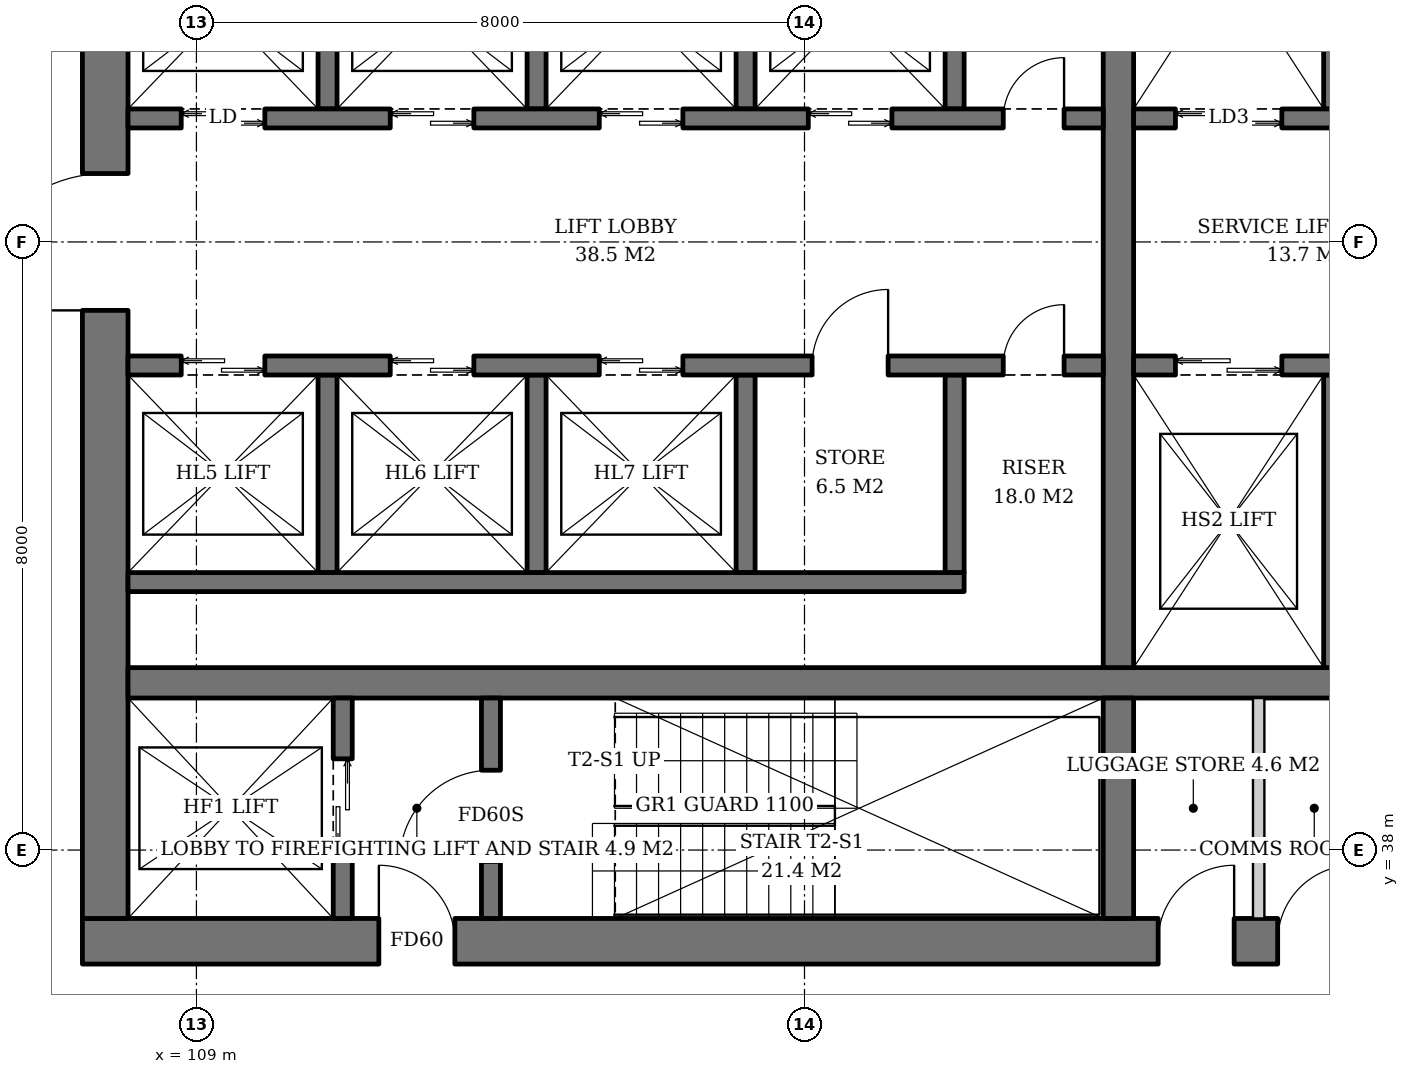
"""IFC4 building model, lengths in metres.
Left out: names, types, materials, properties, quantities, classifications, styles, units other than length and angle.
Written with IfcOpenShell. Run it as: python <this file> out.ifc"""

import sys

from ifc_helpers import new_model, si_unit, direction, frame, frame_2d, origin, place, context, subcontext, project, spatial, rectangle, extrude, element, fill, save


model = new_model("IFC4")
c1 = context("Model", 3, precision=1e-05, world=origin(), true_north=direction((0.0, 1.0)))
c2 = subcontext(c1, "Body", "Model", "MODEL_VIEW")
j1 = project(units=[si_unit("LENGTHUNIT", "METRE"), si_unit("PLANEANGLEUNIT", "RADIAN")], contexts=[c1])
p1 = place(None, origin())
s1 = spatial("IfcSite", under=j1, at=p1, CompositionType="ELEMENT")
p2 = place(p1, origin())
s2 = spatial("IfcBuilding", under=s1, at=p2, CompositionType="ELEMENT")
p3 = place(p2, frame((0.0, 0.0, 47.6)))
s3 = spatial("IfcBuildingStorey", under=s2, at=p3, CompositionType="ELEMENT", Elevation=47.6)
p4 = place(p3, frame((107.5, 36.8, 0.0), z_axis=(0.0, 0.0, 1.0), x_axis=(1.0, 0.0, 0.0)))
e1 = element("IfcWall", 1, at=p4, inside=s3, PredefinedType="SHEAR", context=c2, shape_type="SweptSolid", body=[
    extrude(rectangle(XDim=19.0, YDim=0.6, at=frame_2d((9.5, 0.0))), origin(), (0.0, 0.0, 1.0), 3.8),
])
p5 = place(p4, frame((3.9, 0.0, 0.0)))
e2 = element("IfcOpeningElement", 2, at=p5, cuts=e1, PredefinedType="OPENING", context=c2, shape_type="SweptSolid", body=[
    extrude(rectangle(XDim=1.0, YDim=2.1, at=frame_2d((0.5, 1.05))), frame((0.0, 0.31, 0.0), z_axis=(0.0, -1.0, 0.0), x_axis=(1.0, 0.0, 0.0)), (0.0, 0.0, 1.0), 0.62),
])
p6 = place(p4, frame((14.153, 0.0, 0.0)))
e3 = element("IfcOpeningElement", 3, at=p6, cuts=e1, PredefinedType="OPENING", context=c2, shape_type="SweptSolid", body=[
    extrude(rectangle(XDim=1.0, YDim=2.1, at=frame_2d((0.5, 1.05))), frame((0.0, 0.31, 0.0), z_axis=(0.0, -1.0, 0.0), x_axis=(1.0, 0.0, 0.0)), (0.0, 0.0, 1.0), 0.62),
])
p7 = place(p4, frame((15.725, 0.0, 0.0)))
e4 = element("IfcOpeningElement", 4, at=p7, cuts=e1, PredefinedType="OPENING", context=c2, shape_type="SweptSolid", body=[
    extrude(rectangle(XDim=1.0, YDim=2.1, at=frame_2d((0.5, 1.05))), frame((0.0, 0.31, 0.0), z_axis=(0.0, -1.0, 0.0), x_axis=(1.0, 0.0, 0.0)), (0.0, 0.0, 1.0), 0.62),
])
p8 = place(p4, frame((17.188, 0.0, 0.0)))
e5 = element("IfcOpeningElement", 5, at=p8, cuts=e1, PredefinedType="OPENING", context=c2, shape_type="SweptSolid", body=[
    extrude(rectangle(XDim=1.0, YDim=2.1, at=frame_2d((0.5, 1.05))), frame((0.0, 0.31, 0.0), z_axis=(0.0, -1.0, 0.0), x_axis=(1.0, 0.0, 0.0)), (0.0, 0.0, 1.0), 0.62),
])
p9 = place(p3, frame((107.8, 37.1, 0.0), z_axis=(0.0, 0.0, 1.0), x_axis=(0.0, 1.0, 0.0)))
e6 = element("IfcWall", 6, at=p9, inside=s3, PredefinedType="SHEAR", context=c2, shape_type="SweptSolid", body=[
    extrude(rectangle(XDim=17.8, YDim=0.6, at=frame_2d((8.9, 0.0))), origin(), (0.0, 0.0, 1.0), 3.8),
])
p10 = place(p9, frame((8.0, 0.0, 0.0)))
e7 = element("IfcOpeningElement", 7, at=p10, cuts=e6, PredefinedType="OPENING", context=c2, shape_type="SweptSolid", body=[
    extrude(rectangle(XDim=1.8, YDim=2.4, at=frame_2d((0.9, 1.2))), frame((0.0, 0.31, 0.0), z_axis=(0.0, -1.0, 0.0), x_axis=(1.0, 0.0, 0.0)), (0.0, 0.0, 1.0), 0.62),
])
p11 = place(p3, frame((108.1, 40.2, 0.0), z_axis=(0.0, 0.0, 1.0), x_axis=(1.0, 0.0, 0.0)))
e8 = element("IfcWall", 8, at=p11, inside=s3, PredefinedType="SHEAR", context=c2, shape_type="SweptSolid", body=[
    extrude(rectangle(XDim=17.8, YDim=0.4, at=frame_2d((8.9, 0.0))), origin(), (0.0, 0.0, 1.0), 3.8),
])
p12 = place(p3, frame((121.13, 37.1, 0.0), z_axis=(0.0, 0.0, 1.0), x_axis=(0.0, 1.0, 0.0)))
e9 = element("IfcWall", 9, at=p12, inside=s3, PredefinedType="SHEAR", context=c2, shape_type="SweptSolid", body=[
    extrude(rectangle(XDim=2.9, YDim=0.4, at=frame_2d((1.45, 0.0))), origin(), (0.0, 0.0, 1.0), 3.8),
])
p13 = place(p3, frame((121.13, 40.4, 0.0), z_axis=(0.0, 0.0, 1.0), x_axis=(0.0, 1.0, 0.0)))
e10 = element("IfcWall", 10, at=p13, inside=s3, PredefinedType="SHEAR", context=c2, shape_type="SweptSolid", body=[
    extrude(rectangle(XDim=11.2, YDim=0.4, at=frame_2d((5.6, 0.0))), origin(), (0.0, 0.0, 1.0), 3.8),
])
p14 = place(p3, frame((110.925, 37.1, 0.0), z_axis=(0.0, 0.0, 1.0), x_axis=(0.0, 1.0, 0.0)))
e11 = element("IfcWall", 11, at=p14, inside=s3, PredefinedType="SHEAR", context=c2, shape_type="SweptSolid", body=[
    extrude(rectangle(XDim=2.9, YDim=0.25, at=frame_2d((1.45, 0.0))), origin(), (0.0, 0.0, 1.0), 3.8),
])
p15 = place(p14, frame((0.8, 0.0, 0.0)))
e12 = element("IfcOpeningElement", 12, at=p15, cuts=e11, PredefinedType="OPENING", context=c2, shape_type="SweptSolid", body=[
    extrude(rectangle(XDim=1.3, YDim=2.2, at=frame_2d((0.65, 1.1))), frame((0.0, 0.135, 0.0), z_axis=(0.0, -1.0, 0.0), x_axis=(1.0, 0.0, 0.0)), (0.0, 0.0, 1.0), 0.27),
])
p16 = place(p3, frame((112.875, 37.1, 0.0), z_axis=(0.0, 0.0, 1.0), x_axis=(0.0, 1.0, 0.0)))
e13 = element("IfcWall", 13, at=p16, inside=s3, PredefinedType="SHEAR", context=c2, shape_type="SweptSolid", body=[
    extrude(rectangle(XDim=2.9, YDim=0.25, at=frame_2d((1.45, 0.0))), origin(), (0.0, 0.0, 1.0), 3.8),
])
p17 = place(p16, frame((0.75, 0.0, 0.0)))
e14 = element("IfcOpeningElement", 14, at=p17, cuts=e13, PredefinedType="OPENING", context=c2, shape_type="SweptSolid", body=[
    extrude(rectangle(XDim=1.2, YDim=2.1, at=frame_2d((0.6, 1.05))), frame((0.0, 0.135, 0.0), z_axis=(0.0, -1.0, 0.0), x_axis=(1.0, 0.0, 0.0)), (0.0, 0.0, 1.0), 0.27),
])
for number, where, z_axis, x_axis in (
    (15, (110.725, 47.75, 0.0), (0.0, 0.0, 1.0), (0.0, 1.0, 0.0)),
    (16, (113.475, 47.75, 0.0), (0.0, 0.0, 1.0), (0.0, 1.0, 0.0)),
    (17, (116.225, 47.75, 0.0), (0.0, 0.0, 1.0), (0.0, 1.0, 0.0)),
    (18, (118.975, 47.75, 0.0), (0.0, 0.0, 1.0), (0.0, 1.0, 0.0)),
):
    element("IfcWall", number, at=place(p3, frame(where, z_axis=z_axis, x_axis=x_axis)), inside=s3, PredefinedType="SHEAR", context=c2, shape_type="SweptSolid", body=[
        extrude(rectangle(XDim=2.6, YDim=0.25, at=frame_2d((1.3, 0.0))), origin(), (0.0, 0.0, 1.0), 3.8),
    ])
p18 = place(p3, frame((108.1, 47.625, 0.0), z_axis=(0.0, 0.0, 1.0), x_axis=(1.0, 0.0, 0.0)))
e19 = element("IfcWall", 19, at=p18, inside=s3, PredefinedType="SHEAR", context=c2, shape_type="SweptSolid", body=[
    extrude(rectangle(XDim=12.83, YDim=0.25, at=frame_2d((6.415, 0.0))), origin(), (0.0, 0.0, 1.0), 3.8),
])
p19 = place(p18, frame((0.7, 0.0, 0.0)))
e20 = element("IfcOpeningElement", 20, at=p19, cuts=e19, PredefinedType="OPENING", context=c2, shape_type="SweptSolid", body=[
    extrude(rectangle(XDim=1.1, YDim=2.2, at=frame_2d((0.55, 1.1))), frame((0.0, 0.135, 0.0), z_axis=(0.0, -1.0, 0.0), x_axis=(1.0, 0.0, 0.0)), (0.0, 0.0, 1.0), 0.27),
])
p20 = place(p18, frame((3.45, 0.0, 0.0)))
e21 = element("IfcOpeningElement", 21, at=p20, cuts=e19, PredefinedType="OPENING", context=c2, shape_type="SweptSolid", body=[
    extrude(rectangle(XDim=1.1, YDim=2.2, at=frame_2d((0.55, 1.1))), frame((0.0, 0.135, 0.0), z_axis=(0.0, -1.0, 0.0), x_axis=(1.0, 0.0, 0.0)), (0.0, 0.0, 1.0), 0.27),
])
p21 = place(p18, frame((6.2, 0.0, 0.0)))
e22 = element("IfcOpeningElement", 22, at=p21, cuts=e19, PredefinedType="OPENING", context=c2, shape_type="SweptSolid", body=[
    extrude(rectangle(XDim=1.1, YDim=2.2, at=frame_2d((0.55, 1.1))), frame((0.0, 0.135, 0.0), z_axis=(0.0, -1.0, 0.0), x_axis=(1.0, 0.0, 0.0)), (0.0, 0.0, 1.0), 0.27),
])
p22 = place(p18, frame((8.95, 0.0, 0.0)))
e23 = element("IfcOpeningElement", 23, at=p22, cuts=e19, PredefinedType="OPENING", context=c2, shape_type="SweptSolid", body=[
    extrude(rectangle(XDim=1.1, YDim=2.2, at=frame_2d((0.55, 1.1))), frame((0.0, 0.135, 0.0), z_axis=(0.0, -1.0, 0.0), x_axis=(1.0, 0.0, 0.0)), (0.0, 0.0, 1.0), 0.27),
])
p23 = place(p18, frame((11.515, 0.0, 0.0)))
e24 = element("IfcOpeningElement", 24, at=p23, cuts=e19, PredefinedType="OPENING", context=c2, shape_type="SweptSolid", body=[
    extrude(rectangle(XDim=0.8, YDim=2.0, at=frame_2d((0.4, 1.0))), frame((0.0, 0.135, 0.0), z_axis=(0.0, -1.0, 0.0), x_axis=(1.0, 0.0, 0.0)), (0.0, 0.0, 1.0), 0.27),
])
for number, where, z_axis, x_axis in (
    (25, (110.725, 44.25, 0.0), (0.0, 0.0, 1.0), (0.0, -1.0, 0.0)),
    (26, (113.475, 44.25, 0.0), (0.0, 0.0, 1.0), (0.0, -1.0, 0.0)),
    (27, (116.225, 44.25, 0.0), (0.0, 0.0, 1.0), (0.0, -1.0, 0.0)),
    (28, (118.975, 44.25, 0.0), (0.0, 0.0, 1.0), (0.0, -1.0, 0.0)),
):
    element("IfcWall", number, at=place(p3, frame(where, z_axis=z_axis, x_axis=x_axis)), inside=s3, PredefinedType="SHEAR", context=c2, shape_type="SweptSolid", body=[
        extrude(rectangle(XDim=2.6, YDim=0.25, at=frame_2d((1.3, 0.0))), origin(), (0.0, 0.0, 1.0), 3.8),
    ])
p24 = place(p3, frame((108.1, 41.525, 0.0), z_axis=(0.0, 0.0, 1.0), x_axis=(1.0, 0.0, 0.0)))
e29 = element("IfcWall", 29, at=p24, inside=s3, PredefinedType="SHEAR", context=c2, shape_type="SweptSolid", body=[
    extrude(rectangle(XDim=11.0, YDim=0.25, at=frame_2d((5.5, 0.0))), origin(), (0.0, 0.0, 1.0), 3.8),
])
p25 = place(p3, frame((108.1, 44.375, 0.0), z_axis=(0.0, 0.0, 1.0), x_axis=(1.0, 0.0, 0.0)))
e30 = element("IfcWall", 30, at=p25, inside=s3, PredefinedType="SHEAR", context=c2, shape_type="SweptSolid", body=[
    extrude(rectangle(XDim=12.83, YDim=0.25, at=frame_2d((6.415, 0.0))), origin(), (0.0, 0.0, 1.0), 3.8),
])
p26 = place(p25, frame((0.7, 0.0, 0.0)))
e31 = element("IfcOpeningElement", 31, at=p26, cuts=e30, PredefinedType="OPENING", context=c2, shape_type="SweptSolid", body=[
    extrude(rectangle(XDim=1.1, YDim=2.2, at=frame_2d((0.55, 1.1))), frame((0.0, 0.135, 0.0), z_axis=(0.0, -1.0, 0.0), x_axis=(1.0, 0.0, 0.0)), (0.0, 0.0, 1.0), 0.27),
])
p27 = place(p25, frame((3.45, 0.0, 0.0)))
e32 = element("IfcOpeningElement", 32, at=p27, cuts=e30, PredefinedType="OPENING", context=c2, shape_type="SweptSolid", body=[
    extrude(rectangle(XDim=1.1, YDim=2.2, at=frame_2d((0.55, 1.1))), frame((0.0, 0.135, 0.0), z_axis=(0.0, -1.0, 0.0), x_axis=(1.0, 0.0, 0.0)), (0.0, 0.0, 1.0), 0.27),
])
p28 = place(p25, frame((6.2, 0.0, 0.0)))
e33 = element("IfcOpeningElement", 33, at=p28, cuts=e30, PredefinedType="OPENING", context=c2, shape_type="SweptSolid", body=[
    extrude(rectangle(XDim=1.1, YDim=2.2, at=frame_2d((0.55, 1.1))), frame((0.0, 0.135, 0.0), z_axis=(0.0, -1.0, 0.0), x_axis=(1.0, 0.0, 0.0)), (0.0, 0.0, 1.0), 0.27),
])
p29 = place(p25, frame((9.0, 0.0, 0.0)))
e34 = element("IfcOpeningElement", 34, at=p29, cuts=e30, PredefinedType="OPENING", context=c2, shape_type="SweptSolid", body=[
    extrude(rectangle(XDim=1.0, YDim=2.1, at=frame_2d((0.5, 1.05))), frame((0.0, 0.135, 0.0), z_axis=(0.0, -1.0, 0.0), x_axis=(1.0, 0.0, 0.0)), (0.0, 0.0, 1.0), 0.27),
])
p30 = place(p25, frame((11.515, 0.0, 0.0)))
e35 = element("IfcOpeningElement", 35, at=p30, cuts=e30, PredefinedType="OPENING", context=c2, shape_type="SweptSolid", body=[
    extrude(rectangle(XDim=0.8, YDim=2.0, at=frame_2d((0.4, 1.0))), frame((0.0, 0.135, 0.0), z_axis=(0.0, -1.0, 0.0), x_axis=(1.0, 0.0, 0.0)), (0.0, 0.0, 1.0), 0.27),
])
p31 = place(p3, frame((123.955, 47.75, 0.0), z_axis=(0.0, 0.0, 1.0), x_axis=(0.0, 1.0, 0.0)))
e36 = element("IfcWall", 36, at=p31, inside=s3, PredefinedType="SHEAR", context=c2, shape_type="SweptSolid", body=[
    extrude(rectangle(XDim=3.85, YDim=0.25, at=frame_2d((1.925, 0.0))), origin(), (0.0, 0.0, 1.0), 3.8),
])
p32 = place(p3, frame((121.33, 47.625, 0.0), z_axis=(0.0, 0.0, 1.0), x_axis=(1.0, 0.0, 0.0)))
e37 = element("IfcWall", 37, at=p32, inside=s3, PredefinedType="SHEAR", context=c2, shape_type="SweptSolid", body=[
    extrude(rectangle(XDim=4.57, YDim=0.25, at=frame_2d((2.285, 0.0))), origin(), (0.0, 0.0, 1.0), 3.8),
])
p33 = place(p32, frame((0.55, 0.0, 0.0)))
e38 = element("IfcOpeningElement", 38, at=p33, cuts=e37, PredefinedType="OPENING", context=c2, shape_type="SweptSolid", body=[
    extrude(rectangle(XDim=1.4, YDim=2.4, at=frame_2d((0.7, 1.2))), frame((0.0, 0.135, 0.0), z_axis=(0.0, -1.0, 0.0), x_axis=(1.0, 0.0, 0.0)), (0.0, 0.0, 1.0), 0.27),
])
p34 = place(p32, frame((3.26, 0.0, 0.0)))
e39 = element("IfcOpeningElement", 39, at=p34, cuts=e37, PredefinedType="OPENING", context=c2, shape_type="SweptSolid", body=[
    extrude(rectangle(XDim=0.8, YDim=2.0, at=frame_2d((0.4, 1.0))), frame((0.0, 0.135, 0.0), z_axis=(0.0, -1.0, 0.0), x_axis=(1.0, 0.0, 0.0)), (0.0, 0.0, 1.0), 0.27),
])
p35 = place(p3, frame((123.955, 44.25, 0.0), z_axis=(0.0, 0.0, 1.0), x_axis=(0.0, -1.0, 0.0)))
e40 = element("IfcWall", 40, at=p35, inside=s3, PredefinedType="SHEAR", context=c2, shape_type="SweptSolid", body=[
    extrude(rectangle(XDim=3.85, YDim=0.25, at=frame_2d((1.925, 0.0))), origin(), (0.0, 0.0, 1.0), 3.8),
])
p36 = place(p3, frame((121.33, 44.375, 0.0), z_axis=(0.0, 0.0, 1.0), x_axis=(1.0, 0.0, 0.0)))
e41 = element("IfcWall", 41, at=p36, inside=s3, PredefinedType="SHEAR", context=c2, shape_type="SweptSolid", body=[
    extrude(rectangle(XDim=4.57, YDim=0.25, at=frame_2d((2.285, 0.0))), origin(), (0.0, 0.0, 1.0), 3.8),
])
p37 = place(p36, frame((0.55, 0.0, 0.0)))
e42 = element("IfcOpeningElement", 42, at=p37, cuts=e41, PredefinedType="OPENING", context=c2, shape_type="SweptSolid", body=[
    extrude(rectangle(XDim=1.4, YDim=2.4, at=frame_2d((0.7, 1.2))), frame((0.0, 0.135, 0.0), z_axis=(0.0, -1.0, 0.0), x_axis=(1.0, 0.0, 0.0)), (0.0, 0.0, 1.0), 0.27),
])
p38 = place(p36, frame((3.26, 0.0, 0.0)))
e43 = element("IfcOpeningElement", 43, at=p38, cuts=e41, PredefinedType="OPENING", context=c2, shape_type="SweptSolid", body=[
    extrude(rectangle(XDim=0.8, YDim=2.0, at=frame_2d((0.4, 1.0))), frame((0.0, 0.135, 0.0), z_axis=(0.0, -1.0, 0.0), x_axis=(1.0, 0.0, 0.0)), (0.0, 0.0, 1.0), 0.27),
])
p39 = place(p3, frame((122.975, 37.1, 0.0), z_axis=(0.0, 0.0, 1.0), x_axis=(0.0, 1.0, 0.0)))
e44 = element("IfcWall", 44, at=p39, inside=s3, PredefinedType="SOLIDWALL", context=c2, shape_type="SweptSolid", body=[
    extrude(rectangle(XDim=2.9, YDim=0.15, at=frame_2d((1.45, 0.0))), origin(), (0.0, 0.0, 1.0), 3.6),
])
p40 = place(p15, origin())
e45 = element("IfcDoor", 45, at=p40, inside=s3, OperationType="DOUBLE_DOOR_SLIDING", PredefinedType="DOOR", context=c2, shape_type="SweptSolid", body=[
    extrude(rectangle(XDim=1.3, YDim=2.2, at=frame_2d((0.65, 1.1))), frame((0.0, 0.025, 0.0), z_axis=(0.0, -1.0, 0.0), x_axis=(1.0, 0.0, 0.0)), (0.0, 0.0, 1.0), 0.05),
])
fill(e12, e45)
p41 = place(p17, origin())
e46 = element("IfcDoor", 46, at=p41, inside=s3, OperationType="SINGLE_SWING_LEFT", PredefinedType="DOOR", context=c2, shape_type="SweptSolid", body=[
    extrude(rectangle(XDim=1.2, YDim=2.1, at=frame_2d((0.6, 1.05))), frame((0.0, 0.025, 0.0), z_axis=(0.0, -1.0, 0.0), x_axis=(1.0, 0.0, 0.0)), (0.0, 0.0, 1.0), 0.05),
])
fill(e14, e46)
p42 = place(p19, origin())
e47 = element("IfcDoor", 47, at=p42, inside=s3, OperationType="DOUBLE_DOOR_SLIDING", PredefinedType="DOOR", context=c2, shape_type="SweptSolid", body=[
    extrude(rectangle(XDim=1.1, YDim=2.2, at=frame_2d((0.55, 1.1))), frame((0.0, 0.025, 0.0), z_axis=(0.0, -1.0, 0.0), x_axis=(1.0, 0.0, 0.0)), (0.0, 0.0, 1.0), 0.05),
])
fill(e20, e47)
p43 = place(p20, origin())
e48 = element("IfcDoor", 48, at=p43, inside=s3, OperationType="DOUBLE_DOOR_SLIDING", PredefinedType="DOOR", context=c2, shape_type="SweptSolid", body=[
    extrude(rectangle(XDim=1.1, YDim=2.2, at=frame_2d((0.55, 1.1))), frame((0.0, 0.025, 0.0), z_axis=(0.0, -1.0, 0.0), x_axis=(1.0, 0.0, 0.0)), (0.0, 0.0, 1.0), 0.05),
])
fill(e21, e48)
p44 = place(p21, origin())
e49 = element("IfcDoor", 49, at=p44, inside=s3, OperationType="DOUBLE_DOOR_SLIDING", PredefinedType="DOOR", context=c2, shape_type="SweptSolid", body=[
    extrude(rectangle(XDim=1.1, YDim=2.2, at=frame_2d((0.55, 1.1))), frame((0.0, 0.025, 0.0), z_axis=(0.0, -1.0, 0.0), x_axis=(1.0, 0.0, 0.0)), (0.0, 0.0, 1.0), 0.05),
])
fill(e22, e49)
p45 = place(p22, origin())
e50 = element("IfcDoor", 50, at=p45, inside=s3, OperationType="DOUBLE_DOOR_SLIDING", PredefinedType="DOOR", context=c2, shape_type="SweptSolid", body=[
    extrude(rectangle(XDim=1.1, YDim=2.2, at=frame_2d((0.55, 1.1))), frame((0.0, 0.025, 0.0), z_axis=(0.0, -1.0, 0.0), x_axis=(1.0, 0.0, 0.0)), (0.0, 0.0, 1.0), 0.05),
])
fill(e23, e50)
p46 = place(p23, origin())
e51 = element("IfcDoor", 51, at=p46, inside=s3, OperationType="SINGLE_SWING_RIGHT", PredefinedType="DOOR", context=c2, shape_type="SweptSolid", body=[
    extrude(rectangle(XDim=0.8, YDim=2.0, at=frame_2d((0.4, 1.0))), frame((0.0, 0.025, 0.0), z_axis=(0.0, -1.0, 0.0), x_axis=(1.0, 0.0, 0.0)), (0.0, 0.0, 1.0), 0.05),
])
fill(e24, e51)
p47 = place(p26, origin())
e52 = element("IfcDoor", 52, at=p47, inside=s3, OperationType="DOUBLE_DOOR_SLIDING", PredefinedType="DOOR", context=c2, shape_type="SweptSolid", body=[
    extrude(rectangle(XDim=1.1, YDim=2.2, at=frame_2d((0.55, 1.1))), frame((0.0, 0.025, 0.0), z_axis=(0.0, -1.0, 0.0), x_axis=(1.0, 0.0, 0.0)), (0.0, 0.0, 1.0), 0.05),
])
fill(e31, e52)
p48 = place(p27, origin())
e53 = element("IfcDoor", 53, at=p48, inside=s3, OperationType="DOUBLE_DOOR_SLIDING", PredefinedType="DOOR", context=c2, shape_type="SweptSolid", body=[
    extrude(rectangle(XDim=1.1, YDim=2.2, at=frame_2d((0.55, 1.1))), frame((0.0, 0.025, 0.0), z_axis=(0.0, -1.0, 0.0), x_axis=(1.0, 0.0, 0.0)), (0.0, 0.0, 1.0), 0.05),
])
fill(e32, e53)
p49 = place(p28, origin())
e54 = element("IfcDoor", 54, at=p49, inside=s3, OperationType="DOUBLE_DOOR_SLIDING", PredefinedType="DOOR", context=c2, shape_type="SweptSolid", body=[
    extrude(rectangle(XDim=1.1, YDim=2.2, at=frame_2d((0.55, 1.1))), frame((0.0, 0.025, 0.0), z_axis=(0.0, -1.0, 0.0), x_axis=(1.0, 0.0, 0.0)), (0.0, 0.0, 1.0), 0.05),
])
fill(e33, e54)
p50 = place(p29, origin())
e55 = element("IfcDoor", 55, at=p50, inside=s3, OperationType="SINGLE_SWING_RIGHT", PredefinedType="DOOR", context=c2, shape_type="SweptSolid", body=[
    extrude(rectangle(XDim=1.0, YDim=2.1, at=frame_2d((0.5, 1.05))), frame((0.0, 0.025, 0.0), z_axis=(0.0, -1.0, 0.0), x_axis=(1.0, 0.0, 0.0)), (0.0, 0.0, 1.0), 0.05),
])
fill(e34, e55)
p51 = place(p30, origin())
e56 = element("IfcDoor", 56, at=p51, inside=s3, OperationType="SINGLE_SWING_RIGHT", PredefinedType="DOOR", context=c2, shape_type="SweptSolid", body=[
    extrude(rectangle(XDim=0.8, YDim=2.0, at=frame_2d((0.4, 1.0))), frame((0.0, 0.025, 0.0), z_axis=(0.0, -1.0, 0.0), x_axis=(1.0, 0.0, 0.0)), (0.0, 0.0, 1.0), 0.05),
])
fill(e35, e56)
p52 = place(p33, origin())
e57 = element("IfcDoor", 57, at=p52, inside=s3, OperationType="DOUBLE_DOOR_SLIDING", PredefinedType="DOOR", context=c2, shape_type="SweptSolid", body=[
    extrude(rectangle(XDim=1.4, YDim=2.4, at=frame_2d((0.7, 1.2))), frame((0.0, 0.025, 0.0), z_axis=(0.0, -1.0, 0.0), x_axis=(1.0, 0.0, 0.0)), (0.0, 0.0, 1.0), 0.05),
])
fill(e38, e57)
p53 = place(p37, origin())
e58 = element("IfcDoor", 58, at=p53, inside=s3, OperationType="DOUBLE_DOOR_SLIDING", PredefinedType="DOOR", context=c2, shape_type="SweptSolid", body=[
    extrude(rectangle(XDim=1.4, YDim=2.4, at=frame_2d((0.7, 1.2))), frame((0.0, 0.025, 0.0), z_axis=(0.0, -1.0, 0.0), x_axis=(1.0, 0.0, 0.0)), (0.0, 0.0, 1.0), 0.05),
])
fill(e42, e58)
p54 = place(p5, origin())
e59 = element("IfcDoor", 59, at=p54, inside=s3, OperationType="SINGLE_SWING_LEFT", PredefinedType="DOOR", context=c2, shape_type="SweptSolid", body=[
    extrude(rectangle(XDim=1.0, YDim=2.1, at=frame_2d((0.5, 1.05))), frame((0.0, 0.025, 0.0), z_axis=(0.0, -1.0, 0.0), x_axis=(1.0, 0.0, 0.0)), (0.0, 0.0, 1.0), 0.05),
])
fill(e2, e59)
p55 = place(p10, origin())
e60 = element("IfcDoor", 60, at=p55, inside=s3, OperationType="DOUBLE_DOOR_SINGLE_SWING", PredefinedType="DOOR", context=c2, shape_type="SweptSolid", body=[
    extrude(rectangle(XDim=1.8, YDim=2.4, at=frame_2d((0.9, 1.2))), frame((0.0, 0.025, 0.0), z_axis=(0.0, -1.0, 0.0), x_axis=(1.0, 0.0, 0.0)), (0.0, 0.0, 1.0), 0.05),
])
fill(e7, e60)
p56 = place(p6, origin())
e61 = element("IfcDoor", 61, at=p56, inside=s3, OperationType="SINGLE_SWING_RIGHT", PredefinedType="DOOR", context=c2, shape_type="SweptSolid", body=[
    extrude(rectangle(XDim=1.0, YDim=2.1, at=frame_2d((0.5, 1.05))), frame((0.0, 0.29, 0.0), z_axis=(0.0, -1.0, 0.0), x_axis=(1.0, 0.0, 0.0)), (0.0, 0.0, 1.0), 0.05),
])
fill(e3, e61)
p57 = place(p7, origin())
e62 = element("IfcDoor", 62, at=p57, inside=s3, OperationType="SINGLE_SWING_RIGHT", PredefinedType="DOOR", context=c2, shape_type="SweptSolid", body=[
    extrude(rectangle(XDim=1.0, YDim=2.1, at=frame_2d((0.5, 1.05))), frame((0.0, 0.29, 0.0), z_axis=(0.0, -1.0, 0.0), x_axis=(1.0, 0.0, 0.0)), (0.0, 0.0, 1.0), 0.05),
])
fill(e4, e62)
save(model, sys.argv[1])
